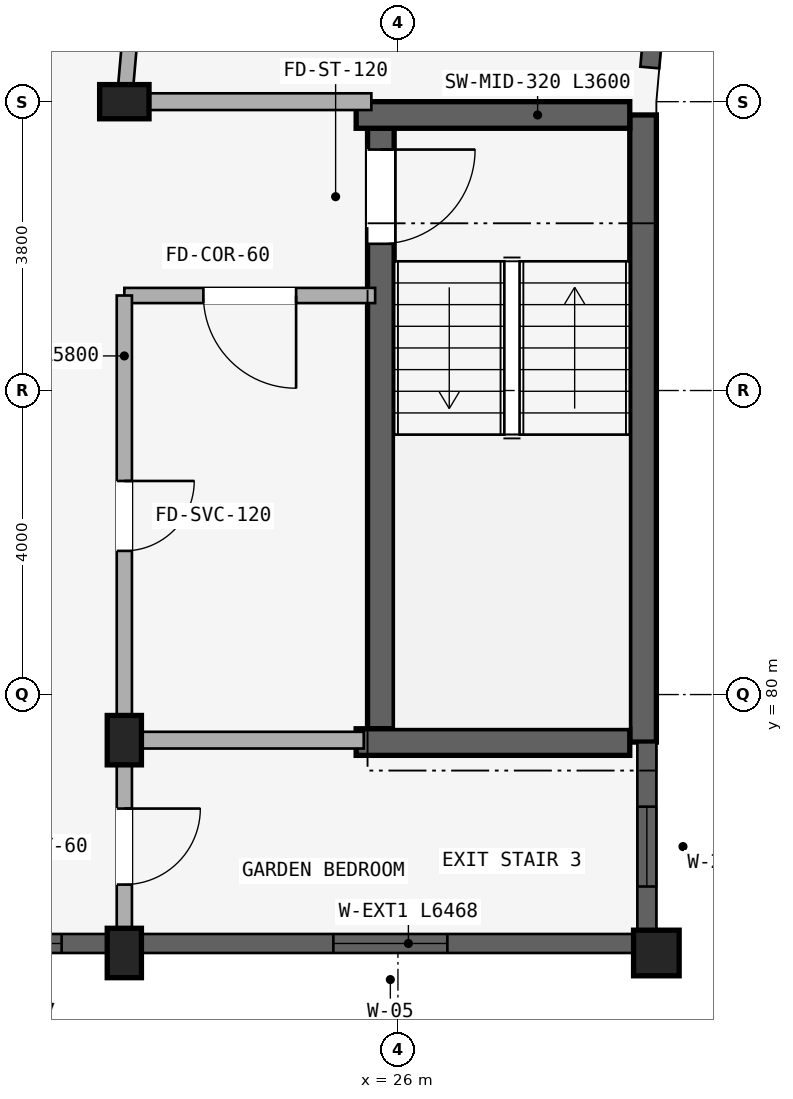
"""IFC4 building model, lengths in metres.
Left out: names, types, materials, properties, quantities, classifications, styles, units other than length and angle.
Written with IfcOpenShell. Run it as: python <this file> out.ifc"""

import sys

from ifc_helpers import new_model, si_unit, direction, frame, frame_2d, origin, origin_2d, place, context, subcontext, project, spatial, rectangle, extrude, element, fill, save


model = new_model("IFC4")
c1 = context("Model", 3, precision=1e-05, world=origin(), true_north=direction((0.0, 1.0)))
c2 = subcontext(c1, "Body", "Model", "MODEL_VIEW")
j1 = project(units=[si_unit("LENGTHUNIT", "METRE"), si_unit("PLANEANGLEUNIT", "RADIAN")], contexts=[c1])
p1 = place(None, origin())
s1 = spatial("IfcSite", under=j1, at=p1, CompositionType="ELEMENT")
p2 = place(p1, origin())
s2 = spatial("IfcBuilding", under=s1, at=p2, CompositionType="ELEMENT")
p3 = place(p2, frame((0.0, 0.0, 33.9)))
s3 = spatial("IfcBuildingStorey", under=s2, at=p3, CompositionType="ELEMENT", Elevation=33.9)
p4 = place(p3, frame((29.225, 87.625, 0.0), z_axis=(0.0, 0.0, 1.0), x_axis=(0.0, -1.0, 0.0)))
e1 = element("IfcWall", 1, at=p4, inside=s3, PredefinedType="SHEAR", context=c2, shape_type="SweptSolid", body=[
    extrude(rectangle(XDim=8.25, YDim=0.35, at=frame_2d((4.125, 0.0))), origin(), (0.0, 0.0, 1.0), 2.93),
])
p5 = place(p3, frame((25.775, 87.45, 0.0), z_axis=(0.0, 0.0, 1.0), x_axis=(0.0, -1.0, 0.0)))
e2 = element("IfcWall", 2, at=p5, inside=s3, PredefinedType="SHEAR", context=c2, shape_type="SweptSolid", body=[
    extrude(rectangle(XDim=7.9, YDim=0.35, at=frame_2d((3.95, 0.0))), origin(), (0.0, 0.0, 1.0), 2.93),
])
p6 = place(p5, frame((0.28, 0.0, 0.0)))
e3 = element("IfcOpeningElement", 3, at=p6, cuts=e2, PredefinedType="OPENING", context=c2, shape_type="SweptSolid", body=[
    extrude(rectangle(XDim=1.24, YDim=2.15, at=frame_2d((0.62, 1.075))), frame((0.0, 0.185, 0.0), z_axis=(0.0, -1.0, 0.0), x_axis=(1.0, 0.0, 0.0)), (0.0, 0.0, 1.0), 0.37),
])
for number, where, z_axis, x_axis in (
    (4, (29.05, 87.625, 0.0), (0.0, 0.0, 1.0), (-1.0, 0.0, 0.0)),
    (5, (29.05, 79.375, 0.0), (0.0, 0.0, 1.0), (-1.0, 0.0, 0.0)),
):
    element("IfcWall", number, at=place(p3, frame(where, z_axis=z_axis, x_axis=x_axis)), inside=s3, PredefinedType="SHEAR", context=c2, shape_type="SweptSolid", body=[
        extrude(rectangle(XDim=3.6, YDim=0.35, at=frame_2d((1.8, 0.0))), origin(), (0.0, 0.0, 1.0), 2.93),
    ])
for number, where, z_axis, x_axis in (
    (6, (22.4, 87.8, 0.0), (0.0, 0.0, 1.0), (0.0, 1.0, 0.0)),
    (7, (22.4, 79.4, 0.0), (0.0, 0.0, 1.0), (1.0, 0.0, 0.0)),
):
    element("IfcColumn", number, at=place(p3, frame(where, z_axis=z_axis, x_axis=x_axis)), inside=s3, PredefinedType="COLUMN", context=c2, shape_type="SweptSolid", body=[
        extrude(rectangle(XDim=0.45, YDim=0.65, at=origin_2d()), origin(), (0.0, 0.0, 1.0), 2.93),
    ])
p7 = place(p3, frame((29.4, 76.6, 0.0), z_axis=(0.0, 0.0, 1.0), x_axis=(1.0, 0.0, 0.0)))
e8 = element("IfcColumn", 8, at=p7, inside=s3, PredefinedType="COLUMN", context=c2, shape_type="SweptSolid", body=[
    extrude(rectangle(XDim=0.6, YDim=0.6, at=origin_2d()), origin(), (0.0, 0.0, 1.0), 2.93),
])
p8 = place(p3, frame((22.4, 76.6, 0.0), z_axis=(0.0, 0.0, 1.0), x_axis=(1.0, 0.0, 0.0)))
e9 = element("IfcColumn", 9, at=p8, inside=s3, PredefinedType="COLUMN", context=c2, shape_type="SweptSolid", body=[
    extrude(rectangle(XDim=0.45, YDim=0.65, at=origin_2d()), origin(), (0.0, 0.0, 1.0), 2.93),
])
p9 = place(p3, frame((25.7, 85.25, 0.0), z_axis=(0.0, 0.0, 1.0), x_axis=(-1.0, 0.0, 0.0)))
e10 = element("IfcWall", 10, at=p9, inside=s3, PredefinedType="STANDARD", context=c2, shape_type="SweptSolid", body=[
    extrude(rectangle(XDim=3.3, YDim=0.2, at=frame_2d((1.65, 0.0))), origin(), (0.0, 0.0, 1.0), 2.372),
])
p10 = place(p9, frame((1.04, 0.0, 0.0)))
e11 = element("IfcOpeningElement", 11, at=p10, cuts=e10, PredefinedType="OPENING", context=c2, shape_type="SweptSolid", body=[
    extrude(rectangle(XDim=1.22, YDim=2.15, at=frame_2d((0.61, 1.075))), frame((0.0, 0.11, 0.0), z_axis=(0.0, -1.0, 0.0), x_axis=(1.0, 0.0, 0.0)), (0.0, 0.0, 1.0), 0.22),
])
p11 = place(p3, frame((22.4, 85.25, 0.0), z_axis=(0.0, 0.0, 1.0), x_axis=(0.0, -1.0, 0.0)))
e12 = element("IfcWall", 12, at=p11, inside=s3, PredefinedType="STANDARD", context=c2, shape_type="SweptSolid", body=[
    extrude(rectangle(XDim=5.8, YDim=0.2, at=frame_2d((2.9, 0.0))), origin(), (0.0, 0.0, 1.0), 2.372),
])
p12 = place(p11, frame((2.44, 0.0, 0.0)))
e13 = element("IfcOpeningElement", 13, at=p12, cuts=e12, PredefinedType="OPENING", context=c2, shape_type="SweptSolid", body=[
    extrude(rectangle(XDim=0.92, YDim=2.1, at=frame_2d((0.46, 1.05))), frame((0.0, 0.11, 0.0), z_axis=(0.0, -1.0, 0.0), x_axis=(1.0, 0.0, 0.0)), (0.0, 0.0, 1.0), 0.22),
])
p13 = place(p3, frame((22.792, 92.28, 0.0), z_axis=(0.0, 0.0, 1.0), x_axis=(-0.087187153726, -0.996191949488, 0.0)))
e14 = element("IfcWall", 14, at=p13, inside=s3, PredefinedType="STANDARD", context=c2, shape_type="SweptSolid", body=[
    extrude(rectangle(XDim=4.497, YDim=0.2, at=frame_2d((2.249, 0.0))), origin(), (0.0, 0.0, 1.0), 2.372),
])
p14 = place(p3, frame((25.65, 87.8, 0.0), z_axis=(0.0, 0.0, 1.0), x_axis=(-1.0, 0.0, 0.0)))
e15 = element("IfcWall", 15, at=p14, inside=s3, PredefinedType="STANDARD", context=c2, shape_type="SweptSolid", body=[
    extrude(rectangle(XDim=3.2, YDim=0.22, at=frame_2d((1.6, 0.0))), origin(), (0.0, 0.0, 1.0), 2.372),
])
p15 = place(p3, frame((22.4, 79.4, 0.0), z_axis=(0.0, 0.0, 1.0), x_axis=(0.0, -1.0, 0.0)))
e16 = element("IfcWall", 16, at=p15, inside=s3, PredefinedType="STANDARD", context=c2, shape_type="SweptSolid", body=[
    extrude(rectangle(XDim=2.8, YDim=0.2, at=frame_2d((1.4, 0.0))), origin(), (0.0, 0.0, 1.0), 2.372),
])
p16 = place(p15, frame((0.9, 0.0, 0.0)))
e17 = element("IfcOpeningElement", 17, at=p16, cuts=e16, PredefinedType="OPENING", context=c2, shape_type="SweptSolid", body=[
    extrude(rectangle(XDim=1.0, YDim=2.15, at=frame_2d((0.5, 1.075))), frame((0.0, 0.11, 0.0), z_axis=(0.0, -1.0, 0.0), x_axis=(1.0, 0.0, 0.0)), (0.0, 0.0, 1.0), 0.22),
])
p17 = place(p3, frame((25.55, 79.4, 0.0), z_axis=(0.0, 0.0, 1.0), x_axis=(-1.0, 0.0, 0.0)))
e18 = element("IfcWall", 18, at=p17, inside=s3, PredefinedType="STANDARD", context=c2, shape_type="SweptSolid", body=[
    extrude(rectangle(XDim=3.1, YDim=0.22, at=frame_2d((1.55, 0.0))), origin(), (0.0, 0.0, 1.0), 2.372),
])
p18 = place(p3, frame((29.537, 90.798, 0.0), z_axis=(0.0, 0.0, 1.0), x_axis=(-0.087222589008, -0.996188847542, 0.0)))
e19 = element("IfcWall", 19, at=p18, inside=s3, PredefinedType="STANDARD", context=c2, shape_type="SweptSolid", body=[
    extrude(rectangle(XDim=2.558, YDim=0.25, at=frame_2d((1.279, 0.0))), origin(), (0.0, 0.0, 1.0), 2.472),
])
p19 = place(p18, frame((0.585, 0.0, 0.672)))
e20 = element("IfcOpeningElement", 20, at=p19, cuts=e19, PredefinedType="OPENING", context=c2, shape_type="SweptSolid", body=[
    extrude(rectangle(XDim=1.55, YDim=1.6, at=frame_2d((0.775, 0.8))), frame((0.0, 0.135, 0.0), z_axis=(0.0, -1.0, 0.0), x_axis=(1.0, 0.0, 0.0)), (0.0, 0.0, 1.0), 0.27),
])
p20 = place(p3, frame((29.275, 79.372, 0.0), z_axis=(0.0, 0.0, 1.0), x_axis=(0.0, -1.0, 0.0)))
e21 = element("IfcWall", 21, at=p20, inside=s3, PredefinedType="STANDARD", context=c2, shape_type="SweptSolid", body=[
    extrude(rectangle(XDim=2.468, YDim=0.25, at=frame_2d((1.234, 0.0))), origin(), (0.0, 0.0, 1.0), 2.472),
])
p21 = place(p20, frame((0.846, 0.0, 0.88)))
e22 = element("IfcOpeningElement", 22, at=p21, cuts=e21, PredefinedType="OPENING", context=c2, shape_type="SweptSolid", body=[
    extrude(rectangle(XDim=1.05, YDim=1.25, at=frame_2d((0.525, 0.625))), frame((0.0, 0.135, 0.0), z_axis=(0.0, -1.0, 0.0), x_axis=(1.0, 0.0, 0.0)), (0.0, 0.0, 1.0), 0.27),
])
p22 = place(p3, frame((29.096, 76.725, 0.0), z_axis=(0.0, 0.0, 1.0), x_axis=(-1.0, 0.0, 0.0)))
e23 = element("IfcWall", 23, at=p22, inside=s3, PredefinedType="STANDARD", context=c2, shape_type="SweptSolid", body=[
    extrude(rectangle(XDim=6.468, YDim=0.25, at=frame_2d((3.234, 0.0))), origin(), (0.0, 0.0, 1.0), 2.372),
])
p23 = place(p22, frame((2.447, 0.0, 0.522)))
e24 = element("IfcOpeningElement", 24, at=p23, cuts=e23, PredefinedType="OPENING", context=c2, shape_type="SweptSolid", body=[
    extrude(rectangle(XDim=1.5, YDim=1.65, at=frame_2d((0.75, 0.825))), frame((0.0, 0.135, 0.0), z_axis=(0.0, -1.0, 0.0), x_axis=(1.0, 0.0, 0.0)), (0.0, 0.0, 1.0), 0.27),
])
p24 = place(p3, frame((22.171, 76.725, 0.0), z_axis=(0.0, 0.0, 1.0), x_axis=(-1.0, 0.0, 0.0)))
e25 = element("IfcWall", 25, at=p24, inside=s3, PredefinedType="STANDARD", context=c2, shape_type="SweptSolid", body=[
    extrude(rectangle(XDim=1.943, YDim=0.25, at=frame_2d((0.971, 0.0))), origin(), (0.0, 0.0, 1.0), 2.372),
])
p25 = place(p24, frame((0.596, 0.0, 0.88)))
e26 = element("IfcOpeningElement", 26, at=p25, cuts=e25, PredefinedType="OPENING", context=c2, shape_type="SweptSolid", body=[
    extrude(rectangle(XDim=0.75, YDim=1.05, at=frame_2d((0.375, 0.525))), frame((0.0, 0.135, 0.0), z_axis=(0.0, -1.0, 0.0), x_axis=(1.0, 0.0, 0.0)), (0.0, 0.0, 1.0), 0.27),
])
p26 = place(p21, origin())
e27 = element("IfcWindow", 27, at=p26, inside=s3, PartitioningType="SINGLE_PANEL", PredefinedType="WINDOW", context=c2, shape_type="SweptSolid", body=[
    extrude(rectangle(XDim=1.05, YDim=1.25, at=frame_2d((0.525, 0.625))), frame((0.0, 0.03, 0.0), z_axis=(0.0, -1.0, 0.0), x_axis=(1.0, 0.0, 0.0)), (0.0, 0.0, 1.0), 0.06),
])
fill(e22, e27)
p27 = place(p23, origin())
e28 = element("IfcWindow", 28, at=p27, inside=s3, PartitioningType="DOUBLE_PANEL_VERTICAL", PredefinedType="WINDOW", context=c2, shape_type="SweptSolid", body=[
    extrude(rectangle(XDim=1.5, YDim=1.65, at=frame_2d((0.75, 0.825))), frame((0.0, 0.03, 0.0), z_axis=(0.0, -1.0, 0.0), x_axis=(1.0, 0.0, 0.0)), (0.0, 0.0, 1.0), 0.06),
])
fill(e24, e28)
p28 = place(p25, origin())
e29 = element("IfcWindow", 29, at=p28, inside=s3, PartitioningType="SINGLE_PANEL", PredefinedType="WINDOW", context=c2, shape_type="SweptSolid", body=[
    extrude(rectangle(XDim=0.75, YDim=1.05, at=frame_2d((0.375, 0.525))), frame((0.0, 0.03, 0.0), z_axis=(0.0, -1.0, 0.0), x_axis=(1.0, 0.0, 0.0)), (0.0, 0.0, 1.0), 0.06),
])
fill(e26, e29)
p29 = place(p6, origin())
e30 = element("IfcDoor", 30, at=p29, inside=s3, OperationType="SINGLE_SWING_LEFT", PredefinedType="DOOR", context=c2, shape_type="SweptSolid", body=[
    extrude(rectangle(XDim=1.24, YDim=2.15, at=frame_2d((0.62, 1.075))), frame((0.0, 0.025, 0.0), z_axis=(0.0, -1.0, 0.0), x_axis=(1.0, 0.0, 0.0)), (0.0, 0.0, 1.0), 0.05),
])
fill(e3, e30)
p30 = place(p10, origin())
e31 = element("IfcDoor", 31, at=p30, inside=s3, OperationType="SINGLE_SWING_LEFT", PredefinedType="DOOR", context=c2, shape_type="SweptSolid", body=[
    extrude(rectangle(XDim=1.22, YDim=2.15, at=frame_2d((0.61, 1.075))), frame((0.0, 0.025, 0.0), z_axis=(0.0, -1.0, 0.0), x_axis=(1.0, 0.0, 0.0)), (0.0, 0.0, 1.0), 0.05),
])
fill(e11, e31)
p31 = place(p12, frame((0.92, 0.0, 0.0), z_axis=(0.0, 0.0, 1.0), x_axis=(-1.0, 0.0, 0.0)))
e32 = element("IfcDoor", 32, at=p31, inside=s3, OperationType="SINGLE_SWING_RIGHT", PredefinedType="DOOR", context=c2, shape_type="SweptSolid", body=[
    extrude(rectangle(XDim=0.92, YDim=2.1, at=frame_2d((0.46, 1.05))), frame((0.0, 0.025, 0.0), z_axis=(0.0, -1.0, 0.0), x_axis=(1.0, 0.0, 0.0)), (0.0, 0.0, 1.0), 0.05),
])
fill(e13, e32)
p32 = place(p16, origin())
e33 = element("IfcDoor", 33, at=p32, inside=s3, OperationType="SINGLE_SWING_LEFT", PredefinedType="DOOR", context=c2, shape_type="SweptSolid", body=[
    extrude(rectangle(XDim=1.0, YDim=2.15, at=frame_2d((0.5, 1.075))), frame((0.0, 0.025, 0.0), z_axis=(0.0, -1.0, 0.0), x_axis=(1.0, 0.0, 0.0)), (0.0, 0.0, 1.0), 0.05),
])
fill(e17, e33)
save(model, sys.argv[1])
